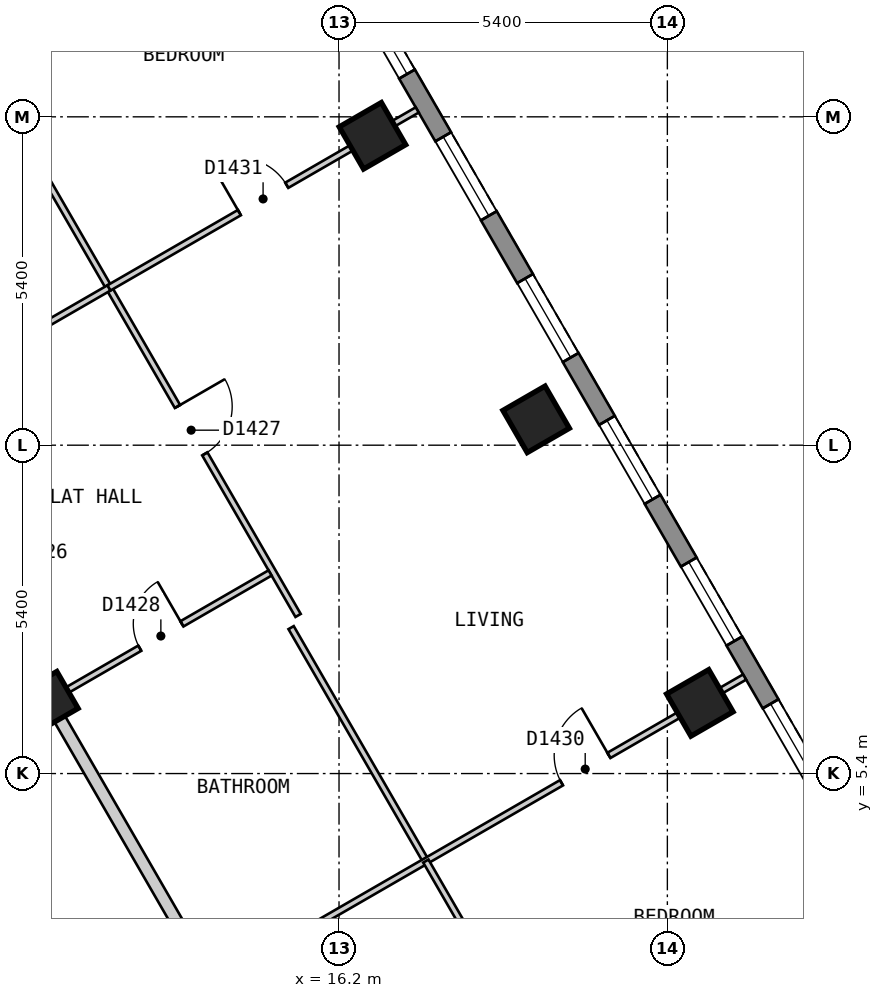
"""IFC4 building model, lengths in metres.
Left out: names, types, materials, properties, quantities, classifications, styles, units other than length and angle.
Written with IfcOpenShell. Run it as: python <this file> out.ifc"""

import sys

from ifc_helpers import new_model, si_unit, direction, frame, frame_2d, origin, origin_2d, place, context, subcontext, project, spatial, polyline, rectangle, outline, extrude, element, fill, save


model = new_model("IFC4")
c1 = context("Model", 3, precision=1e-05, world=origin(), true_north=direction((0.0, 1.0)))
c2 = subcontext(c1, "Body", "Model", "MODEL_VIEW")
j1 = project(units=[si_unit("LENGTHUNIT", "METRE"), si_unit("PLANEANGLEUNIT", "RADIAN")], contexts=[c1])
p1 = place(None, origin())
s1 = spatial("IfcSite", under=j1, at=p1, CompositionType="ELEMENT")
p2 = place(p1, origin())
s2 = spatial("IfcBuilding", under=s1, at=p2, CompositionType="ELEMENT")
p3 = place(p2, frame((0.0, 0.0, 172.2)))
s3 = spatial("IfcBuildingStorey", under=s2, at=p3, CompositionType="ELEMENT", Elevation=172.2)
for number, where, z_axis, x_axis in (
    (1, (22.134, 6.562, 0.0), (0.0, 0.0, 1.0), (-0.5, 0.866, 0.0)),
    (2, (19.442, 11.225, 0.0), (0.0, 0.0, 1.0), (-0.5, 0.866, 0.0)),
    (3, (16.75, 15.888, 0.0), (0.0, 0.0, 1.0), (-0.5, 0.866, 0.0)),
):
    element("IfcColumn", number, at=place(p3, frame(where, z_axis=z_axis, x_axis=x_axis)), inside=s3, PredefinedType="COLUMN", context=c2, shape_type="SweptSolid", body=[
        extrude(rectangle(XDim=0.8, YDim=0.8, at=origin_2d()), origin(), (0.0, 0.0, 1.0), 3.0),
    ])
p4 = place(p3, frame((11.431, 6.6, 0.0), z_axis=(0.0, 0.0, 1.0), x_axis=(-0.5, 0.866025403784, 0.0)))
e4 = element("IfcColumn", 4, at=p4, inside=s3, PredefinedType="COLUMN", context=c2, shape_type="SweptSolid", body=[
    extrude(rectangle(XDim=0.7, YDim=0.7, at=origin_2d()), origin(), (0.0, 0.0, 1.0), 3.0),
])
p5 = place(p3, frame((26.024, 1.825, 0.0), z_axis=(0.0, 0.0, 1.0), x_axis=(-0.500010537973, 0.866019319597, 0.0)))
e5 = element("IfcWall", 5, at=p5, inside=s3, PredefinedType="SOLIDWALL", context=c2, shape_type="SweptSolid", body=[
    extrude(outline(polyline([(0.0, -0.15), (22.863, -0.15), (22.783, 0.15), (0.08, 0.15), (0.0, -0.15)])), origin(), (0.0, 0.0, 1.0), 2.7),
])
p6 = place(p5, frame((1.259, 0.0, 0.15)))
e6 = element("IfcOpeningElement", 6, at=p6, cuts=e5, PredefinedType="OPENING", context=c2, shape_type="SweptSolid", body=[
    extrude(rectangle(XDim=1.5, YDim=2.1, at=frame_2d((0.75, 1.05))), frame((0.0, 0.16, 0.0), z_axis=(0.0, -1.0, 0.0), x_axis=(1.0, 0.0, 0.0)), (0.0, 0.0, 1.0), 0.32),
])
p7 = place(p5, frame((3.952, 0.0, 0.15)))
e7 = element("IfcOpeningElement", 7, at=p7, cuts=e5, PredefinedType="OPENING", context=c2, shape_type="SweptSolid", body=[
    extrude(rectangle(XDim=1.5, YDim=2.1, at=frame_2d((0.75, 1.05))), frame((0.0, 0.16, 0.0), z_axis=(0.0, -1.0, 0.0), x_axis=(1.0, 0.0, 0.0)), (0.0, 0.0, 1.0), 0.32),
])
p8 = place(p5, frame((6.644, 0.0, 0.15)))
e8 = element("IfcOpeningElement", 8, at=p8, cuts=e5, PredefinedType="OPENING", context=c2, shape_type="SweptSolid", body=[
    extrude(rectangle(XDim=1.5, YDim=2.1, at=frame_2d((0.75, 1.05))), frame((0.0, 0.16, 0.0), z_axis=(0.0, -1.0, 0.0), x_axis=(1.0, 0.0, 0.0)), (0.0, 0.0, 1.0), 0.32),
])
p9 = place(p5, frame((9.335, 0.0, 0.15)))
e9 = element("IfcOpeningElement", 9, at=p9, cuts=e5, PredefinedType="OPENING", context=c2, shape_type="SweptSolid", body=[
    extrude(rectangle(XDim=1.5, YDim=2.1, at=frame_2d((0.75, 1.05))), frame((0.0, 0.16, 0.0), z_axis=(0.0, -1.0, 0.0), x_axis=(1.0, 0.0, 0.0)), (0.0, 0.0, 1.0), 0.32),
])
p10 = place(p5, frame((12.028, 0.0, 0.15)))
e10 = element("IfcOpeningElement", 10, at=p10, cuts=e5, PredefinedType="OPENING", context=c2, shape_type="SweptSolid", body=[
    extrude(rectangle(XDim=1.5, YDim=2.1, at=frame_2d((0.75, 1.05))), frame((0.0, 0.16, 0.0), z_axis=(0.0, -1.0, 0.0), x_axis=(1.0, 0.0, 0.0)), (0.0, 0.0, 1.0), 0.32),
])
p11 = place(p5, frame((14.72, 0.0, 0.15)))
e11 = element("IfcOpeningElement", 11, at=p11, cuts=e5, PredefinedType="OPENING", context=c2, shape_type="SweptSolid", body=[
    extrude(rectangle(XDim=1.5, YDim=2.1, at=frame_2d((0.75, 1.05))), frame((0.0, 0.16, 0.0), z_axis=(0.0, -1.0, 0.0), x_axis=(1.0, 0.0, 0.0)), (0.0, 0.0, 1.0), 0.32),
])
p12 = place(p5, frame((17.411, 0.0, 0.15)))
e12 = element("IfcOpeningElement", 12, at=p12, cuts=e5, PredefinedType="OPENING", context=c2, shape_type="SweptSolid", body=[
    extrude(rectangle(XDim=1.5, YDim=2.1, at=frame_2d((0.75, 1.05))), frame((0.0, 0.16, 0.0), z_axis=(0.0, -1.0, 0.0), x_axis=(1.0, 0.0, 0.0)), (0.0, 0.0, 1.0), 0.32),
])
p13 = place(p5, frame((20.104, 0.0, 0.15)))
e13 = element("IfcOpeningElement", 13, at=p13, cuts=e5, PredefinedType="OPENING", context=c2, shape_type="SweptSolid", body=[
    extrude(rectangle(XDim=1.5, YDim=2.1, at=frame_2d((0.75, 1.05))), frame((0.0, 0.16, 0.0), z_axis=(0.0, -1.0, 0.0), x_axis=(1.0, 0.0, 0.0)), (0.0, 0.0, 1.0), 0.32),
])
p14 = place(p3, frame((9.469, 5.6, 0.0), z_axis=(0.0, 0.0, 1.0), x_axis=(0.499964524401, -0.866045884662, 0.0)))
e14 = element("IfcWall", 14, at=p14, inside=s3, PredefinedType="PARTITIONING", context=c2, shape_type="SweptSolid", body=[
    extrude(rectangle(XDim=7.042, YDim=0.2, at=frame_2d((3.521, 0.0))), origin(), (0.0, 0.0, 1.0), 2.7),
])
p15 = place(p14, frame((3.129, 0.0, 0.0)))
e15 = element("IfcOpeningElement", 15, at=p15, cuts=e14, PredefinedType="OPENING", context=c2, shape_type="SweptSolid", body=[
    extrude(rectangle(XDim=0.9, YDim=2.1, at=frame_2d((0.45, 1.05))), frame((0.0, 0.11, 0.0), z_axis=(0.0, -1.0, 0.0), x_axis=(1.0, 0.0, 0.0)), (0.0, 0.0, 1.0), 0.22),
])
p16 = place(p3, frame((10.739, 7.8, 0.0), z_axis=(0.0, 0.0, 1.0), x_axis=(0.499964311759, -0.86604600742, 0.0)))
e16 = element("IfcWall", 16, at=p16, inside=s3, PredefinedType="PARTITIONING", context=c2, shape_type="SweptSolid", body=[
    extrude(rectangle(XDim=9.583, YDim=0.2, at=frame_2d((4.792, 0.0))), origin(), (0.0, 0.0, 1.0), 2.7),
])
p17 = place(p3, frame((15.412, 7.8, 0.0), z_axis=(0.0, 0.0, 1.0), x_axis=(0.499882970317, -0.866092960361, 0.0)))
e17 = element("IfcWall", 17, at=p17, inside=s3, PredefinedType="PARTITIONING", context=c2, shape_type="SweptSolid", body=[
    extrude(rectangle(XDim=4.433, YDim=0.1, at=frame_2d((2.216, 0.0))), origin(), (0.0, 0.0, 1.0), 2.7),
])
p18 = place(p3, frame((9.827, 17.874, 0.0), z_axis=(0.0, 0.0, 1.0), x_axis=(0.499962189394, -0.866047232647, 0.0)))
e18 = element("IfcWall", 18, at=p18, inside=s3, PredefinedType="PARTITIONING", context=c2, shape_type="SweptSolid", body=[
    extrude(rectangle(XDim=11.401, YDim=0.1, at=frame_2d((5.701, 0.0))), origin(), (0.0, 0.0, 1.0), 2.7),
])
p19 = place(p18, frame((7.433, 0.0, 0.0)))
e19 = element("IfcOpeningElement", 19, at=p19, cuts=e18, PredefinedType="OPENING", context=c2, shape_type="SweptSolid", body=[
    extrude(rectangle(XDim=0.9, YDim=2.1, at=frame_2d((0.45, 1.05))), frame((0.0, 0.06, 0.0), z_axis=(0.0, -1.0, 0.0), x_axis=(1.0, 0.0, 0.0)), (0.0, 0.0, 1.0), 0.12),
])
p20 = place(p3, frame((14.21, 1.987, 0.0), z_axis=(0.0, 0.0, 1.0), x_axis=(0.866022959057, 0.500004234368, 0.0)))
e20 = element("IfcWall", 20, at=p20, inside=s3, PredefinedType="PARTITIONING", context=c2, shape_type="SweptSolid", body=[
    extrude(rectangle(XDim=10.0, YDim=0.1, at=frame_2d((5.0, 0.0))), origin(), (0.0, 0.0, 1.0), 2.7),
])
p21 = place(p20, frame((6.523, 0.0, 0.0)))
e21 = element("IfcOpeningElement", 21, at=p21, cuts=e20, PredefinedType="OPENING", context=c2, shape_type="SweptSolid", body=[
    extrude(rectangle(XDim=0.9, YDim=2.1, at=frame_2d((0.45, 1.05))), frame((0.0, 0.06, 0.0), z_axis=(0.0, -1.0, 0.0), x_axis=(1.0, 0.0, 0.0)), (0.0, 0.0, 1.0), 0.12),
])
p22 = place(p3, frame((11.518, 6.65, 0.0), z_axis=(0.0, 0.0, 1.0), x_axis=(0.865949381454, 0.500131651427, 0.0)))
e22 = element("IfcWall", 22, at=p22, inside=s3, PredefinedType="PARTITIONING", context=c2, shape_type="SweptSolid", body=[
    extrude(rectangle(XDim=4.097, YDim=0.1, at=frame_2d((2.049, 0.0))), origin(), (0.0, 0.0, 1.0), 2.7),
])
p23 = place(p22, frame((1.623, 0.0, 0.0)))
e23 = element("IfcOpeningElement", 23, at=p23, cuts=e22, PredefinedType="OPENING", context=c2, shape_type="SweptSolid", body=[
    extrude(rectangle(XDim=0.8, YDim=2.1, at=frame_2d((0.4, 1.05))), frame((0.0, 0.06, 0.0), z_axis=(0.0, -1.0, 0.0), x_axis=(1.0, 0.0, 0.0)), (0.0, 0.0, 1.0), 0.12),
])
p24 = place(p3, frame((8.999, 11.413, 0.0), z_axis=(0.0, 0.0, 1.0), x_axis=(0.865969252911, 0.500097243556, 0.0)))
e24 = element("IfcWall", 24, at=p24, inside=s3, PredefinedType="PARTITIONING", context=c2, shape_type="SweptSolid", body=[
    extrude(rectangle(XDim=3.947, YDim=0.1, at=frame_2d((1.974, 0.0))), origin(), (0.0, 0.0, 1.0), 2.7),
])
p25 = place(p24, frame((1.474, 0.0, 0.0)))
e25 = element("IfcOpeningElement", 25, at=p25, cuts=e24, PredefinedType="OPENING", context=c2, shape_type="SweptSolid", body=[
    extrude(rectangle(XDim=0.9, YDim=2.1, at=frame_2d((0.45, 1.05))), frame((0.0, 0.06, 0.0), z_axis=(0.0, -1.0, 0.0), x_axis=(1.0, 0.0, 0.0)), (0.0, 0.0, 1.0), 0.12),
])
p26 = place(p3, frame((17.628, 3.961, 0.0), z_axis=(0.0, 0.0, 1.0), x_axis=(0.50003162148, -0.866007146345, 0.0)))
e26 = element("IfcWall", 26, at=p26, inside=s3, PredefinedType="PARTITIONING", context=c2, shape_type="SweptSolid", body=[
    extrude(rectangle(XDim=3.076, YDim=0.1, at=frame_2d((1.538, 0.0))), origin(), (0.0, 0.0, 1.0), 2.7),
])
p27 = place(p26, frame((1.167, 0.0, 0.0)))
e27 = element("IfcOpeningElement", 27, at=p27, cuts=e26, PredefinedType="OPENING", context=c2, shape_type="SweptSolid", body=[
    extrude(rectangle(XDim=0.8, YDim=2.1, at=frame_2d((0.4, 1.05))), frame((0.0, 0.06, 0.0), z_axis=(0.0, -1.0, 0.0), x_axis=(1.0, 0.0, 0.0)), (0.0, 0.0, 1.0), 0.12),
])
p28 = place(p3, frame((12.417, 13.387, 0.0), z_axis=(0.0, 0.0, 1.0), x_axis=(0.866070981966, 0.499921047963, 0.0)))
e28 = element("IfcWall", 28, at=p28, inside=s3, PredefinedType="PARTITIONING", context=c2, shape_type="SweptSolid", body=[
    extrude(rectangle(XDim=5.853, YDim=0.1, at=frame_2d((2.927, 0.0))), origin(), (0.0, 0.0, 1.0), 2.7),
])
p29 = place(p28, frame((2.476, 0.0, 0.0)))
e29 = element("IfcOpeningElement", 29, at=p29, cuts=e28, PredefinedType="OPENING", context=c2, shape_type="SweptSolid", body=[
    extrude(rectangle(XDim=0.9, YDim=2.1, at=frame_2d((0.45, 1.05))), frame((0.0, 0.06, 0.0), z_axis=(0.0, -1.0, 0.0), x_axis=(1.0, 0.0, 0.0)), (0.0, 0.0, 1.0), 0.12),
])
p30 = place(p7, origin())
e30 = element("IfcWindow", 30, at=p30, inside=s3, PartitioningType="SINGLE_PANEL", PredefinedType="WINDOW", context=c2, shape_type="SweptSolid", body=[
    extrude(rectangle(XDim=1.5, YDim=2.1, at=frame_2d((0.75, 1.05))), frame((0.0, 0.03, 0.0), z_axis=(0.0, -1.0, 0.0), x_axis=(1.0, 0.0, 0.0)), (0.0, 0.0, 1.0), 0.06),
])
fill(e7, e30)
p31 = place(p8, origin())
e31 = element("IfcWindow", 31, at=p31, inside=s3, PartitioningType="SINGLE_PANEL", PredefinedType="WINDOW", context=c2, shape_type="SweptSolid", body=[
    extrude(rectangle(XDim=1.5, YDim=2.1, at=frame_2d((0.75, 1.05))), frame((0.0, 0.03, 0.0), z_axis=(0.0, -1.0, 0.0), x_axis=(1.0, 0.0, 0.0)), (0.0, 0.0, 1.0), 0.06),
])
fill(e8, e31)
p32 = place(p9, origin())
e32 = element("IfcWindow", 32, at=p32, inside=s3, PartitioningType="SINGLE_PANEL", PredefinedType="WINDOW", context=c2, shape_type="SweptSolid", body=[
    extrude(rectangle(XDim=1.5, YDim=2.1, at=frame_2d((0.75, 1.05))), frame((0.0, 0.03, 0.0), z_axis=(0.0, -1.0, 0.0), x_axis=(1.0, 0.0, 0.0)), (0.0, 0.0, 1.0), 0.06),
])
fill(e9, e32)
p33 = place(p10, origin())
e33 = element("IfcWindow", 33, at=p33, inside=s3, PartitioningType="SINGLE_PANEL", PredefinedType="WINDOW", context=c2, shape_type="SweptSolid", body=[
    extrude(rectangle(XDim=1.5, YDim=2.1, at=frame_2d((0.75, 1.05))), frame((0.0, 0.03, 0.0), z_axis=(0.0, -1.0, 0.0), x_axis=(1.0, 0.0, 0.0)), (0.0, 0.0, 1.0), 0.06),
])
fill(e10, e33)
p34 = place(p11, origin())
e34 = element("IfcWindow", 34, at=p34, inside=s3, PartitioningType="SINGLE_PANEL", PredefinedType="WINDOW", context=c2, shape_type="SweptSolid", body=[
    extrude(rectangle(XDim=1.5, YDim=2.1, at=frame_2d((0.75, 1.05))), frame((0.0, 0.03, 0.0), z_axis=(0.0, -1.0, 0.0), x_axis=(1.0, 0.0, 0.0)), (0.0, 0.0, 1.0), 0.06),
])
fill(e11, e34)
p35 = place(p12, origin())
e35 = element("IfcWindow", 35, at=p35, inside=s3, PartitioningType="SINGLE_PANEL", PredefinedType="WINDOW", context=c2, shape_type="SweptSolid", body=[
    extrude(rectangle(XDim=1.5, YDim=2.1, at=frame_2d((0.75, 1.05))), frame((0.0, 0.03, 0.0), z_axis=(0.0, -1.0, 0.0), x_axis=(1.0, 0.0, 0.0)), (0.0, 0.0, 1.0), 0.06),
])
fill(e12, e35)
p36 = place(p19, origin())
e36 = element("IfcDoor", 36, at=p36, inside=s3, OperationType="SINGLE_SWING_LEFT", PredefinedType="DOOR", context=c2, shape_type="SweptSolid", body=[
    extrude(rectangle(XDim=0.9, YDim=2.1, at=frame_2d((0.45, 1.05))), frame((0.0, 0.025, 0.0), z_axis=(0.0, -1.0, 0.0), x_axis=(1.0, 0.0, 0.0)), (0.0, 0.0, 1.0), 0.05),
])
fill(e19, e36)
p37 = place(p23, origin())
e37 = element("IfcDoor", 37, at=p37, inside=s3, OperationType="SINGLE_SWING_RIGHT", PredefinedType="DOOR", context=c2, shape_type="SweptSolid", body=[
    extrude(rectangle(XDim=0.8, YDim=2.1, at=frame_2d((0.4, 1.05))), frame((0.0, 0.025, 0.0), z_axis=(0.0, -1.0, 0.0), x_axis=(1.0, 0.0, 0.0)), (0.0, 0.0, 1.0), 0.05),
])
fill(e23, e37)
p38 = place(p21, origin())
e38 = element("IfcDoor", 38, at=p38, inside=s3, OperationType="SINGLE_SWING_RIGHT", PredefinedType="DOOR", context=c2, shape_type="SweptSolid", body=[
    extrude(rectangle(XDim=0.9, YDim=2.1, at=frame_2d((0.45, 1.05))), frame((0.0, 0.025, 0.0), z_axis=(0.0, -1.0, 0.0), x_axis=(1.0, 0.0, 0.0)), (0.0, 0.0, 1.0), 0.05),
])
fill(e21, e38)
p39 = place(p29, origin())
e39 = element("IfcDoor", 39, at=p39, inside=s3, OperationType="SINGLE_SWING_LEFT", PredefinedType="DOOR", context=c2, shape_type="SweptSolid", body=[
    extrude(rectangle(XDim=0.9, YDim=2.1, at=frame_2d((0.45, 1.05))), frame((0.0, 0.025, 0.0), z_axis=(0.0, -1.0, 0.0), x_axis=(1.0, 0.0, 0.0)), (0.0, 0.0, 1.0), 0.05),
])
fill(e29, e39)
save(model, sys.argv[1])
